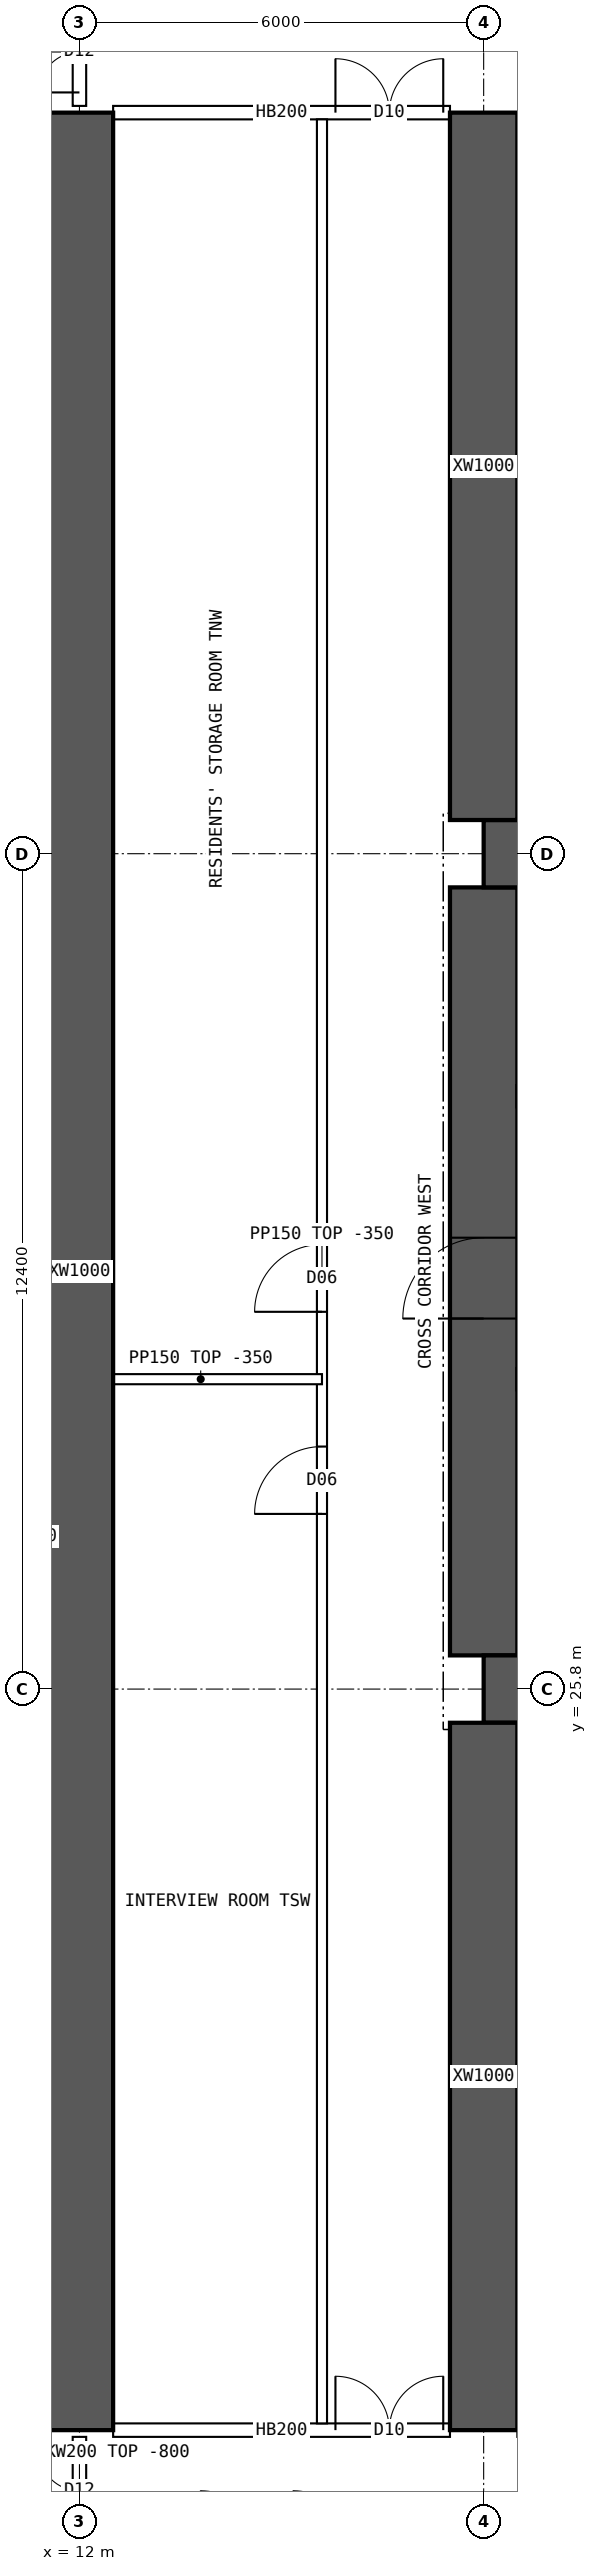
"""IFC4 building model, lengths in metres.
Left out: names, types, materials, properties, quantities, classifications, styles, units other than length and angle.
Written with IfcOpenShell. Run it as: python <this file> out.ifc"""

import sys

from ifc_helpers import new_model, si_unit, direction, frame, frame_2d, origin, place, context, subcontext, project, spatial, polyline, rectangle, outline, extrude, element, fill, save


model = new_model("IFC4")
c1 = context("Model", 3, precision=1e-05, world=origin(), true_north=direction((0.0, 1.0)))
c2 = subcontext(c1, "Body", "Model", "MODEL_VIEW")
j1 = project(units=[si_unit("LENGTHUNIT", "METRE"), si_unit("PLANEANGLEUNIT", "RADIAN")], contexts=[c1])
p1 = place(None, origin())
s1 = spatial("IfcSite", under=j1, at=p1, CompositionType="ELEMENT")
p2 = place(p1, origin())
s2 = spatial("IfcBuilding", under=s1, at=p2, CompositionType="ELEMENT")
p3 = place(p2, frame((0.0, 0.0, 65.2)))
s3 = spatial("IfcBuildingStorey", under=s2, at=p3, CompositionType="ELEMENT", Elevation=65.2)
for number, where, z_axis, x_axis in (
    (1, (18.0, 25.8, 0.0), (0.0, 0.0, 1.0), (1.0, 0.0, 0.0)),
    (2, (18.0, 38.2, 0.0), (0.0, 0.0, 1.0), (1.0, 0.0, 0.0)),
):
    element("IfcWall", number, at=place(p3, frame(where, z_axis=z_axis, x_axis=x_axis)), inside=s3, PredefinedType="SHEAR", context=c2, shape_type="SweptSolid", body=[
        extrude(rectangle(XDim=48.0, YDim=1.0, at=frame_2d((24.0, 0.0))), origin(), (0.0, 0.0, 1.0), 3.75),
    ])
p4 = place(p3, frame((18.0, 26.3, 0.0), z_axis=(0.0, 0.0, 1.0), x_axis=(0.0, 1.0, 0.0)))
e3 = element("IfcWall", 3, at=p4, inside=s3, PredefinedType="SHEAR", context=c2, shape_type="SweptSolid", body=[
    extrude(rectangle(XDim=11.4, YDim=1.0, at=frame_2d((5.7, 0.0))), origin(), (0.0, 0.0, 1.0), 3.75),
])
p5 = place(p4, frame((5.0, 0.0, 0.0)))
e4 = element("IfcOpeningElement", 4, at=p5, cuts=e3, PredefinedType="OPENING", context=c2, shape_type="SweptSolid", body=[
    extrude(rectangle(XDim=1.2, YDim=2.1, at=frame_2d((0.6, 1.05))), frame((0.0, 0.51, 0.0), z_axis=(0.0, -1.0, 0.0), x_axis=(1.0, 0.0, 0.0)), (0.0, 0.0, 1.0), 1.02),
])
p6 = place(p3, frame((12.0, 14.8, 0.0), z_axis=(0.0, 0.0, 1.0), x_axis=(0.0, 1.0, 0.0)))
e5 = element("IfcWall", 5, at=p6, inside=s3, PredefinedType="SHEAR", context=c2, shape_type="SweptSolid", body=[
    extrude(rectangle(XDim=34.4, YDim=1.0, at=frame_2d((17.2, 0.0))), origin(), (0.0, 0.0, 1.0), 3.75),
])
for number, where, z_axis, x_axis in (
    (6, (18.0, 14.8, 0.0), (0.0, 0.0, 1.0), (0.0, 1.0, 0.0)),
    (7, (18.0, 38.7, 0.0), (0.0, 0.0, 1.0), (0.0, 1.0, 0.0)),
):
    element("IfcWall", number, at=place(p3, frame(where, z_axis=z_axis, x_axis=x_axis)), inside=s3, PredefinedType="SHEAR", context=c2, shape_type="SweptSolid", body=[
        extrude(rectangle(XDim=10.5, YDim=1.0, at=frame_2d((5.25, 0.0))), origin(), (0.0, 0.0, 1.0), 3.75),
    ])
p7 = place(p3, frame((12.5, 14.8, 0.0), z_axis=(0.0, 0.0, 1.0), x_axis=(1.0, 0.0, 0.0)))
e8 = element("IfcWall", 8, at=p7, inside=s3, PredefinedType="SOLIDWALL", context=c2, shape_type="SweptSolid", body=[
    extrude(rectangle(XDim=5.0, YDim=0.2, at=frame_2d((2.5, 0.0))), origin(), (0.0, 0.0, 1.0), 3.4),
])
p8 = place(p7, frame((3.3, 0.0, 0.0)))
e9 = element("IfcOpeningElement", 9, at=p8, cuts=e8, PredefinedType="OPENING", context=c2, shape_type="SweptSolid", body=[
    extrude(rectangle(XDim=1.6, YDim=2.1, at=frame_2d((0.8, 1.05))), frame((0.0, 0.11, 0.0), z_axis=(0.0, -1.0, 0.0), x_axis=(1.0, 0.0, 0.0)), (0.0, 0.0, 1.0), 0.22),
])
p9 = place(p3, frame((12.5, 49.2, 0.0), z_axis=(0.0, 0.0, 1.0), x_axis=(1.0, 0.0, 0.0)))
e10 = element("IfcWall", 10, at=p9, inside=s3, PredefinedType="SOLIDWALL", context=c2, shape_type="SweptSolid", body=[
    extrude(rectangle(XDim=5.0, YDim=0.2, at=frame_2d((2.5, 0.0))), origin(), (0.0, 0.0, 1.0), 3.4),
])
p10 = place(p9, frame((3.3, 0.0, 0.0)))
e11 = element("IfcOpeningElement", 11, at=p10, cuts=e10, PredefinedType="OPENING", context=c2, shape_type="SweptSolid", body=[
    extrude(rectangle(XDim=1.6, YDim=2.1, at=frame_2d((0.8, 1.05))), frame((0.0, 0.11, 0.0), z_axis=(0.0, -1.0, 0.0), x_axis=(1.0, 0.0, 0.0)), (0.0, 0.0, 1.0), 0.22),
])
p11 = place(p3, frame((15.6, 14.9, 0.0), z_axis=(0.0, 0.0, 1.0), x_axis=(0.0, 1.0, 0.0)))
e12 = element("IfcWall", 12, at=p11, inside=s3, PredefinedType="PARTITIONING", context=c2, shape_type="SweptSolid", body=[
    extrude(rectangle(XDim=34.2, YDim=0.15, at=frame_2d((17.1, 0.0))), origin(), (0.0, 0.0, 1.0), 3.4),
])
p12 = place(p11, frame((13.5, 0.0, 0.0)))
e13 = element("IfcOpeningElement", 13, at=p12, cuts=e12, PredefinedType="OPENING", context=c2, shape_type="SweptSolid", body=[
    extrude(rectangle(XDim=1.0, YDim=2.1, at=frame_2d((0.5, 1.05))), frame((0.0, 0.085, 0.0), z_axis=(0.0, -1.0, 0.0), x_axis=(1.0, 0.0, 0.0)), (0.0, 0.0, 1.0), 0.17),
])
p13 = place(p11, frame((16.5, 0.0, 0.0)))
e14 = element("IfcOpeningElement", 14, at=p13, cuts=e12, PredefinedType="OPENING", context=c2, shape_type="SweptSolid", body=[
    extrude(rectangle(XDim=1.0, YDim=2.1, at=frame_2d((0.5, 1.05))), frame((0.0, 0.085, 0.0), z_axis=(0.0, -1.0, 0.0), x_axis=(1.0, 0.0, 0.0)), (0.0, 0.0, 1.0), 0.17),
])
p14 = place(p3, frame((12.0, 30.4, 0.0), z_axis=(0.0, 0.0, 1.0), x_axis=(1.0, 0.0, 0.0)))
e15 = element("IfcWall", 15, at=p14, inside=s3, PredefinedType="PARTITIONING", context=c2, shape_type="SweptSolid", body=[
    extrude(rectangle(XDim=3.6, YDim=0.15, at=frame_2d((1.8, 0.0))), origin(), (0.0, 0.0, 1.0), 3.4),
])
p15 = place(p3, frame((3.905, 30.85, 0.0), z_axis=(0.0, 0.0, 1.0), x_axis=(1.0, 0.0, 0.0)))
e16 = element("IfcWall", 16, at=p15, inside=s3, PredefinedType="PARTITIONING", context=c2, shape_type="SweptSolid", body=[
    extrude(outline(polyline([(0.0, 0.0), (8.02, 0.0), (8.02, 3.4), (2.397, 3.4), (2.395, 2.95), (1.797, 2.95), (1.795, 3.4), (0.0, 3.4), (0.0, 0.0)])), frame((0.0, 0.075, 0.0), z_axis=(0.0, -1.0, 0.0), x_axis=(1.0, 0.0, 0.0)), (0.0, 0.0, 1.0), 0.15),
])
p16 = place(p3, frame((12.0, 13.1, 0.0), z_axis=(0.0, 0.0, 1.0), x_axis=(0.0, 1.0, 0.0)))
e17 = element("IfcWall", 17, at=p16, inside=s3, PredefinedType="SOLIDWALL", context=c2, shape_type="SweptSolid", body=[
    extrude(outline(polyline([(0.0, 0.0), (1.6, 0.0), (1.6, 2.95), (0.0, 2.95), (0.0, 0.0)])), frame((0.0, 0.1, 0.0), z_axis=(0.0, -1.0, 0.0), x_axis=(1.0, 0.0, 0.0)), (0.0, 0.0, 1.0), 0.2),
])
p17 = place(p16, frame((0.2, 0.0, 0.0)))
e18 = element("IfcOpeningElement", 18, at=p17, cuts=e17, PredefinedType="OPENING", context=c2, shape_type="SweptSolid", body=[
    extrude(rectangle(XDim=1.2, YDim=2.1, at=frame_2d((0.6, 1.05))), frame((0.0, 0.11, 0.0), z_axis=(0.0, -1.0, 0.0), x_axis=(1.0, 0.0, 0.0)), (0.0, 0.0, 1.0), 0.22),
])
p18 = place(p3, frame((12.0, 49.3, 0.0), z_axis=(0.0, 0.0, 1.0), x_axis=(0.0, 1.0, 0.0)))
e19 = element("IfcWall", 19, at=p18, inside=s3, PredefinedType="SOLIDWALL", context=c2, shape_type="SweptSolid", body=[
    extrude(outline(polyline([(0.0, 0.0), (1.6, 0.0), (1.6, 2.95), (0.0, 2.95), (0.0, 0.0)])), frame((0.0, 0.1, 0.0), z_axis=(0.0, -1.0, 0.0), x_axis=(1.0, 0.0, 0.0)), (0.0, 0.0, 1.0), 0.2),
])
p19 = place(p18, frame((0.2, 0.0, 0.0)))
e20 = element("IfcOpeningElement", 20, at=p19, cuts=e19, PredefinedType="OPENING", context=c2, shape_type="SweptSolid", body=[
    extrude(rectangle(XDim=1.2, YDim=2.1, at=frame_2d((0.6, 1.05))), frame((0.0, 0.11, 0.0), z_axis=(0.0, -1.0, 0.0), x_axis=(1.0, 0.0, 0.0)), (0.0, 0.0, 1.0), 0.22),
])
p20 = place(p5, origin())
e21 = element("IfcDoor", 21, at=p20, inside=s3, OperationType="SINGLE_SWING_LEFT", PredefinedType="DOOR", context=c2, shape_type="SweptSolid", body=[
    extrude(rectangle(XDim=1.2, YDim=2.1, at=frame_2d((0.6, 1.05))), frame((0.0, 0.025, 0.0), z_axis=(0.0, -1.0, 0.0), x_axis=(1.0, 0.0, 0.0)), (0.0, 0.0, 1.0), 0.05),
])
fill(e4, e21)
p21 = place(p8, origin())
e22 = element("IfcDoor", 22, at=p21, inside=s3, OperationType="DOUBLE_DOOR_SINGLE_SWING", PredefinedType="DOOR", context=c2, shape_type="SweptSolid", body=[
    extrude(rectangle(XDim=1.6, YDim=2.1, at=frame_2d((0.8, 1.05))), frame((0.0, 0.025, 0.0), z_axis=(0.0, -1.0, 0.0), x_axis=(1.0, 0.0, 0.0)), (0.0, 0.0, 1.0), 0.05),
])
fill(e9, e22)
p22 = place(p10, origin())
e23 = element("IfcDoor", 23, at=p22, inside=s3, OperationType="DOUBLE_DOOR_SINGLE_SWING", PredefinedType="DOOR", context=c2, shape_type="SweptSolid", body=[
    extrude(rectangle(XDim=1.6, YDim=2.1, at=frame_2d((0.8, 1.05))), frame((0.0, 0.025, 0.0), z_axis=(0.0, -1.0, 0.0), x_axis=(1.0, 0.0, 0.0)), (0.0, 0.0, 1.0), 0.05),
])
fill(e11, e23)
p23 = place(p12, origin())
e24 = element("IfcDoor", 24, at=p23, inside=s3, OperationType="SINGLE_SWING_LEFT", PredefinedType="DOOR", context=c2, shape_type="SweptSolid", body=[
    extrude(rectangle(XDim=1.0, YDim=2.1, at=frame_2d((0.5, 1.05))), frame((0.0, 0.025, 0.0), z_axis=(0.0, -1.0, 0.0), x_axis=(1.0, 0.0, 0.0)), (0.0, 0.0, 1.0), 0.05),
])
fill(e13, e24)
p24 = place(p13, origin())
e25 = element("IfcDoor", 25, at=p24, inside=s3, OperationType="SINGLE_SWING_LEFT", PredefinedType="DOOR", context=c2, shape_type="SweptSolid", body=[
    extrude(rectangle(XDim=1.0, YDim=2.1, at=frame_2d((0.5, 1.05))), frame((0.0, 0.025, 0.0), z_axis=(0.0, -1.0, 0.0), x_axis=(1.0, 0.0, 0.0)), (0.0, 0.0, 1.0), 0.05),
])
fill(e14, e25)
p25 = place(p17, origin())
e26 = element("IfcDoor", 26, at=p25, inside=s3, OperationType="DOUBLE_DOOR_SINGLE_SWING", PredefinedType="DOOR", context=c2, shape_type="SweptSolid", body=[
    extrude(rectangle(XDim=1.2, YDim=2.1, at=frame_2d((0.6, 1.05))), frame((0.0, 0.025, 0.0), z_axis=(0.0, -1.0, 0.0), x_axis=(1.0, 0.0, 0.0)), (0.0, 0.0, 1.0), 0.05),
])
fill(e18, e26)
p26 = place(p19, origin())
e27 = element("IfcDoor", 27, at=p26, inside=s3, OperationType="DOUBLE_DOOR_SINGLE_SWING", PredefinedType="DOOR", context=c2, shape_type="SweptSolid", body=[
    extrude(rectangle(XDim=1.2, YDim=2.1, at=frame_2d((0.6, 1.05))), frame((0.0, 0.025, 0.0), z_axis=(0.0, -1.0, 0.0), x_axis=(1.0, 0.0, 0.0)), (0.0, 0.0, 1.0), 0.05),
])
fill(e20, e27)
save(model, sys.argv[1])
